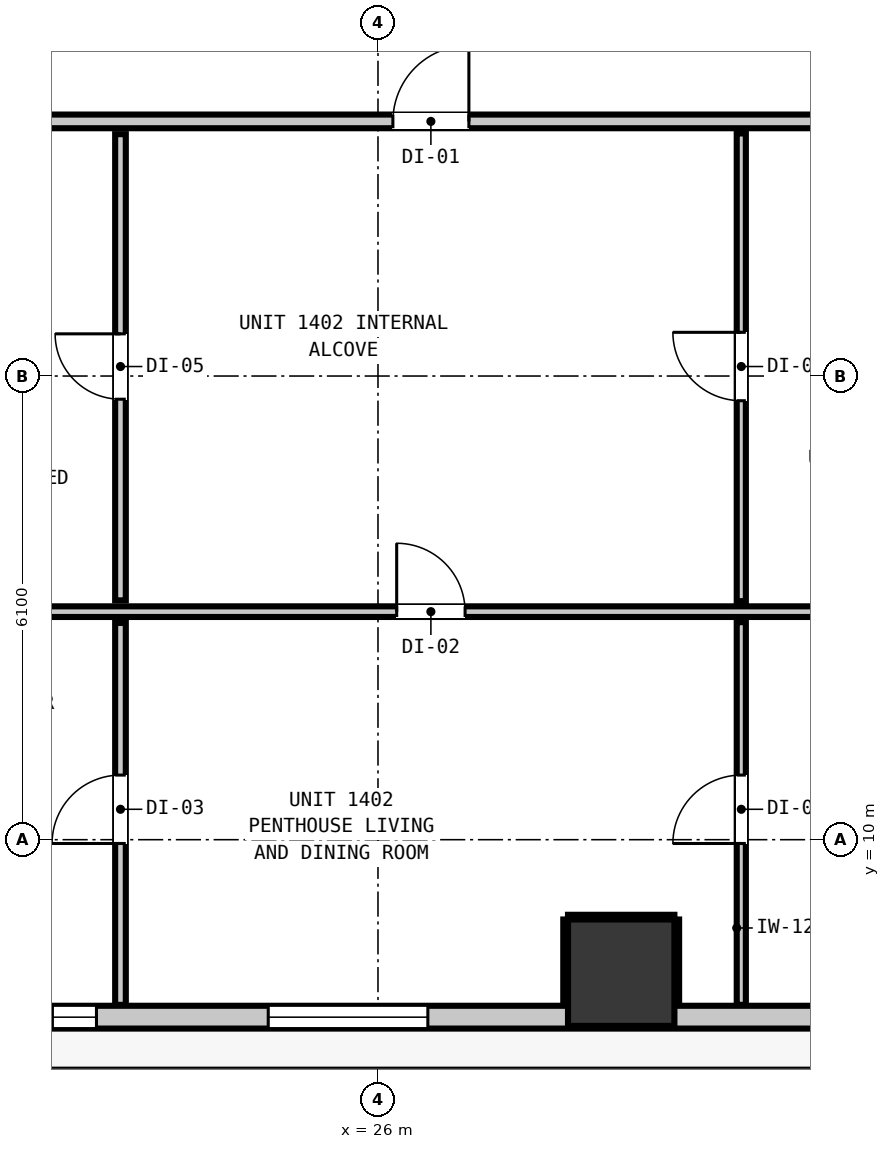
"""IFC4 building model, lengths in metres.
Left out: names, types, materials, properties, quantities, classifications, styles, units other than length and angle.
Written with IfcOpenShell. Run it as: python <this file> out.ifc"""

import sys

from ifc_helpers import new_model, si_unit, direction, frame, frame_2d, origin, origin_2d, place, context, subcontext, project, spatial, rectangle, extrude, element, fill, save


model = new_model("IFC4")
c1 = context("Model", 3, precision=1e-05, world=origin(), true_north=direction((0.0, 1.0)))
c2 = subcontext(c1, "Body", "Model", "MODEL_VIEW")
j1 = project(units=[si_unit("LENGTHUNIT", "METRE"), si_unit("PLANEANGLEUNIT", "RADIAN")], contexts=[c1])
p1 = place(None, origin())
s1 = spatial("IfcSite", under=j1, at=p1, CompositionType="ELEMENT")
p2 = place(p1, origin())
s2 = spatial("IfcBuilding", under=s1, at=p2, CompositionType="ELEMENT")
p3 = place(p2, frame((0.0, 0.0, 51.88)))
s3 = spatial("IfcBuildingStorey", under=s2, at=p3, CompositionType="ELEMENT", Elevation=51.88)
p4 = place(p3, frame((29.2, 8.25, 0.0), z_axis=(0.0, 0.0, 1.0), x_axis=(1.0, 0.0, 0.0)))
e1 = element("IfcColumn", 1, at=p4, inside=s3, PredefinedType="COLUMN", context=c2, shape_type="SweptSolid", body=[
    extrude(rectangle(XDim=1.4, YDim=1.4, at=origin_2d()), origin(), (0.0, 0.0, 1.0), 3.32),
])
p5 = place(p3, frame((47.835, 7.665, 0.0), z_axis=(0.0, 0.0, 1.0), x_axis=(-1.0, 0.0, 0.0)))
e2 = element("IfcWall", 2, at=p5, inside=s3, PredefinedType="STANDARD", context=c2, shape_type="SweptSolid", body=[
    extrude(rectangle(XDim=37.47, YDim=0.3, at=frame_2d((18.735, 0.0))), origin(), (0.0, 0.0, 1.0), 3.06),
])
p6 = place(p5, frame((2.301, 0.0, 0.0)))
e3 = element("IfcOpeningElement", 3, at=p6, cuts=e2, PredefinedType="OPENING", context=c2, shape_type="SweptSolid", body=[
    extrude(rectangle(XDim=1.0, YDim=2.15, at=frame_2d((0.5, 1.075))), frame((0.0, 0.16, 0.0), z_axis=(0.0, -1.0, 0.0), x_axis=(1.0, 0.0, 0.0)), (0.0, 0.0, 1.0), 0.32),
])
p7 = place(p5, frame((32.251, 0.0, 0.85)))
e4 = element("IfcOpeningElement", 4, at=p7, cuts=e2, PredefinedType="OPENING", context=c2, shape_type="SweptSolid", body=[
    extrude(rectangle(XDim=1.05, YDim=1.65, at=frame_2d((0.525, 0.825))), frame((0.0, 0.16, 0.0), z_axis=(0.0, -1.0, 0.0), x_axis=(1.0, 0.0, 0.0)), (0.0, 0.0, 1.0), 0.32),
])
p8 = place(p5, frame((21.179, 0.0, 0.85)))
e5 = element("IfcOpeningElement", 5, at=p8, cuts=e2, PredefinedType="OPENING", context=c2, shape_type="SweptSolid", body=[
    extrude(rectangle(XDim=2.1, YDim=1.9, at=frame_2d((1.05, 0.95))), frame((0.0, 0.16, 0.0), z_axis=(0.0, -1.0, 0.0), x_axis=(1.0, 0.0, 0.0)), (0.0, 0.0, 1.0), 0.32),
])
p9 = place(p5, frame((25.539, 0.0, 0.85)))
e6 = element("IfcOpeningElement", 6, at=p9, cuts=e2, PredefinedType="OPENING", context=c2, shape_type="SweptSolid", body=[
    extrude(rectangle(XDim=0.58, YDim=1.5, at=frame_2d((0.29, 0.75))), frame((0.0, 0.16, 0.0), z_axis=(0.0, -1.0, 0.0), x_axis=(1.0, 0.0, 0.0)), (0.0, 0.0, 1.0), 0.32),
])
p10 = place(p5, frame((13.985, 0.0, 0.85)))
e7 = element("IfcOpeningElement", 7, at=p10, cuts=e2, PredefinedType="OPENING", context=c2, shape_type="SweptSolid", body=[
    extrude(rectangle(XDim=2.1, YDim=1.9, at=frame_2d((1.05, 0.95))), frame((0.0, 0.16, 0.0), z_axis=(0.0, -1.0, 0.0), x_axis=(1.0, 0.0, 0.0)), (0.0, 0.0, 1.0), 0.32),
])
p11 = place(p5, frame((5.412, 0.0, 0.85)))
e8 = element("IfcOpeningElement", 8, at=p11, cuts=e2, PredefinedType="OPENING", context=c2, shape_type="SweptSolid", body=[
    extrude(rectangle(XDim=2.1, YDim=1.9, at=frame_2d((1.05, 0.95))), frame((0.0, 0.16, 0.0), z_axis=(0.0, -1.0, 0.0), x_axis=(1.0, 0.0, 0.0)), (0.0, 0.0, 1.0), 0.32),
])
p12 = place(p5, frame((9.839, 0.0, 0.85)))
e9 = element("IfcOpeningElement", 9, at=p12, cuts=e2, PredefinedType="OPENING", context=c2, shape_type="SweptSolid", body=[
    extrude(rectangle(XDim=0.58, YDim=1.5, at=frame_2d((0.29, 0.75))), frame((0.0, 0.16, 0.0), z_axis=(0.0, -1.0, 0.0), x_axis=(1.0, 0.0, 0.0)), (0.0, 0.0, 1.0), 0.32),
])
p13 = place(p5, frame((0.364, 0.0, 0.85)))
e10 = element("IfcOpeningElement", 10, at=p13, cuts=e2, PredefinedType="OPENING", context=c2, shape_type="SweptSolid", body=[
    extrude(rectangle(XDim=1.05, YDim=1.65, at=frame_2d((0.525, 0.825))), frame((0.0, 0.16, 0.0), z_axis=(0.0, -1.0, 0.0), x_axis=(1.0, 0.0, 0.0)), (0.0, 0.0, 1.0), 0.32),
])
p14 = place(p3, frame((8.027, 19.45, 0.0), z_axis=(0.0, 0.0, 1.0), x_axis=(1.0, 0.0, 0.0)))
e11 = element("IfcWall", 11, at=p14, inside=s3, PredefinedType="PARTITIONING", context=c2, shape_type="SweptSolid", body=[
    extrude(rectangle(XDim=42.146, YDim=0.18, at=frame_2d((21.073, 0.0))), origin(), (0.0, 0.0, 1.0), 3.06),
])
p15 = place(p14, frame((5.256, 0.0, 0.0)))
e12 = element("IfcOpeningElement", 12, at=p15, cuts=e11, PredefinedType="OPENING", context=c2, shape_type="SweptSolid", body=[
    extrude(rectangle(XDim=1.0, YDim=2.15, at=frame_2d((0.5, 1.075))), frame((0.0, 0.1, 0.0), z_axis=(0.0, -1.0, 0.0), x_axis=(1.0, 0.0, 0.0)), (0.0, 0.0, 1.0), 0.2),
])
p16 = place(p14, frame((18.169, 0.0, 0.0)))
e13 = element("IfcOpeningElement", 13, at=p16, cuts=e11, PredefinedType="OPENING", context=c2, shape_type="SweptSolid", body=[
    extrude(rectangle(XDim=1.0, YDim=2.15, at=frame_2d((0.5, 1.075))), frame((0.0, 0.1, 0.0), z_axis=(0.0, -1.0, 0.0), x_axis=(1.0, 0.0, 0.0)), (0.0, 0.0, 1.0), 0.2),
])
p17 = place(p14, frame((33.653, 0.0, 0.0)))
e14 = element("IfcOpeningElement", 14, at=p17, cuts=e11, PredefinedType="OPENING", context=c2, shape_type="SweptSolid", body=[
    extrude(rectangle(XDim=1.0, YDim=2.15, at=frame_2d((0.5, 1.075))), frame((0.0, 0.1, 0.0), z_axis=(0.0, -1.0, 0.0), x_axis=(1.0, 0.0, 0.0)), (0.0, 0.0, 1.0), 0.2),
])
p18 = place(p3, frame((19.12, 13.0, 0.0), z_axis=(0.0, 0.0, 1.0), x_axis=(1.0, 0.0, 0.0)))
e15 = element("IfcWall", 15, at=p18, inside=s3, PredefinedType="PARTITIONING", context=c2, shape_type="SweptSolid", body=[
    extrude(rectangle(XDim=31.053, YDim=0.14, at=frame_2d((15.526, 0.0))), origin(), (0.0, 0.0, 1.0), 3.06),
])
p19 = place(p18, frame((7.126, 0.0, 0.0)))
e16 = element("IfcOpeningElement", 16, at=p19, cuts=e15, PredefinedType="OPENING", context=c2, shape_type="SweptSolid", body=[
    extrude(rectangle(XDim=0.9, YDim=2.1, at=frame_2d((0.45, 1.05))), frame((0.0, 0.08, 0.0), z_axis=(0.0, -1.0, 0.0), x_axis=(1.0, 0.0, 0.0)), (0.0, 0.0, 1.0), 0.16),
])
p20 = place(p18, frame((22.609, 0.0, 0.0)))
e17 = element("IfcOpeningElement", 17, at=p20, cuts=e15, PredefinedType="OPENING", context=c2, shape_type="SweptSolid", body=[
    extrude(rectangle(XDim=0.9, YDim=2.1, at=frame_2d((0.45, 1.05))), frame((0.0, 0.08, 0.0), z_axis=(0.0, -1.0, 0.0), x_axis=(1.0, 0.0, 0.0)), (0.0, 0.0, 1.0), 0.16),
])
p21 = place(p3, frame((22.612, 7.827, 0.0), z_axis=(0.0, 0.0, 1.0), x_axis=(0.0, 1.0, 0.0)))
e18 = element("IfcWall", 18, at=p21, inside=s3, PredefinedType="PARTITIONING", context=c2, shape_type="SweptSolid", body=[
    extrude(rectangle(XDim=5.025, YDim=0.14, at=frame_2d((2.513, 0.0))), origin(), (0.0, 0.0, 1.0), 3.06),
])
p22 = place(p21, frame((2.123, 0.0, 0.0)))
e19 = element("IfcOpeningElement", 19, at=p22, cuts=e18, PredefinedType="OPENING", context=c2, shape_type="SweptSolid", body=[
    extrude(rectangle(XDim=0.9, YDim=2.1, at=frame_2d((0.45, 1.05))), frame((0.0, 0.08, 0.0), z_axis=(0.0, -1.0, 0.0), x_axis=(1.0, 0.0, 0.0)), (0.0, 0.0, 1.0), 0.16),
])
p23 = place(p3, frame((22.612, 13.148, 0.0), z_axis=(0.0, 0.0, 1.0), x_axis=(0.0, 1.0, 0.0)))
e20 = element("IfcWall", 20, at=p23, inside=s3, PredefinedType="PARTITIONING", context=c2, shape_type="SweptSolid", body=[
    extrude(rectangle(XDim=6.134, YDim=0.14, at=frame_2d((3.067, 0.0))), origin(), (0.0, 0.0, 1.0), 3.06),
])
p24 = place(p23, frame((2.647, 0.0, 0.0)))
e21 = element("IfcOpeningElement", 21, at=p24, cuts=e20, PredefinedType="OPENING", context=c2, shape_type="SweptSolid", body=[
    extrude(rectangle(XDim=0.86, YDim=2.02, at=frame_2d((0.43, 1.01))), frame((0.0, 0.08, 0.0), z_axis=(0.0, -1.0, 0.0), x_axis=(1.0, 0.0, 0.0)), (0.0, 0.0, 1.0), 0.16),
])
p25 = place(p3, frame((30.78, 7.827, 0.0), z_axis=(0.0, 0.0, 1.0), x_axis=(0.0, 1.0, 0.0)))
e22 = element("IfcWall", 22, at=p25, inside=s3, PredefinedType="PARTITIONING", context=c2, shape_type="SweptSolid", body=[
    extrude(rectangle(XDim=5.035, YDim=0.12, at=frame_2d((2.518, 0.0))), origin(), (0.0, 0.0, 1.0), 3.06),
])
p26 = place(p25, frame((2.123, 0.0, 0.0)))
e23 = element("IfcOpeningElement", 23, at=p26, cuts=e22, PredefinedType="OPENING", context=c2, shape_type="SweptSolid", body=[
    extrude(rectangle(XDim=0.9, YDim=2.1, at=frame_2d((0.45, 1.05))), frame((0.0, 0.07, 0.0), z_axis=(0.0, -1.0, 0.0), x_axis=(1.0, 0.0, 0.0)), (0.0, 0.0, 1.0), 0.14),
])
p27 = place(p3, frame((30.78, 13.138, 0.0), z_axis=(0.0, 0.0, 1.0), x_axis=(0.0, 1.0, 0.0)))
e24 = element("IfcWall", 24, at=p27, inside=s3, PredefinedType="PARTITIONING", context=c2, shape_type="SweptSolid", body=[
    extrude(rectangle(XDim=6.154, YDim=0.12, at=frame_2d((3.077, 0.0))), origin(), (0.0, 0.0, 1.0), 3.06),
])
p28 = place(p27, frame((2.637, 0.0, 0.0)))
e25 = element("IfcOpeningElement", 25, at=p28, cuts=e24, PredefinedType="OPENING", context=c2, shape_type="SweptSolid", body=[
    extrude(rectangle(XDim=0.9, YDim=2.1, at=frame_2d((0.45, 1.05))), frame((0.0, 0.07, 0.0), z_axis=(0.0, -1.0, 0.0), x_axis=(1.0, 0.0, 0.0)), (0.0, 0.0, 1.0), 0.14),
])
p29 = place(p3, frame((28.5, 8.982, 0.0), z_axis=(0.0, 0.0, 1.0), x_axis=(1.0, 0.0, 0.0)))
e26 = element("IfcWall", 26, at=p29, inside=s3, PredefinedType="PARTITIONING", context=c2, shape_type="SweptSolid", body=[
    extrude(rectangle(XDim=1.4, YDim=0.06, at=frame_2d((0.7, 0.0))), origin(), (0.0, 0.0, 1.0), 1.45),
])
for number, where, z_axis, x_axis in (
    (27, (28.468, 7.83, 0.0), (0.0, 0.0, 1.0), (0.0, 1.0, 0.0)),
    (28, (29.932, 7.83, 0.0), (0.0, 0.0, 1.0), (0.0, 1.0, 0.0)),
):
    element("IfcWall", number, at=place(p3, frame(where, z_axis=z_axis, x_axis=x_axis)), inside=s3, PredefinedType="PARTITIONING", context=c2, shape_type="SweptSolid", body=[
        extrude(rectangle(XDim=1.12, YDim=0.06, at=frame_2d((0.56, 0.0))), origin(), (0.0, 0.0, 1.0), 1.45),
    ])
p30 = place(p8, origin())
e29 = element("IfcWindow", 29, at=p30, inside=s3, PartitioningType="SINGLE_PANEL", PredefinedType="WINDOW", context=c2, shape_type="SweptSolid", body=[
    extrude(rectangle(XDim=2.1, YDim=1.9, at=frame_2d((1.05, 0.95))), frame((0.0, 0.03, 0.0), z_axis=(0.0, -1.0, 0.0), x_axis=(1.0, 0.0, 0.0)), (0.0, 0.0, 1.0), 0.06),
])
fill(e5, e29)
p31 = place(p9, origin())
e30 = element("IfcWindow", 30, at=p31, inside=s3, PartitioningType="SINGLE_PANEL", PredefinedType="WINDOW", context=c2, shape_type="SweptSolid", body=[
    extrude(rectangle(XDim=0.58, YDim=1.5, at=frame_2d((0.29, 0.75))), frame((0.0, 0.03, 0.0), z_axis=(0.0, -1.0, 0.0), x_axis=(1.0, 0.0, 0.0)), (0.0, 0.0, 1.0), 0.06),
])
fill(e6, e30)
p32 = place(p16, origin())
e31 = element("IfcDoor", 31, at=p32, inside=s3, OperationType="SINGLE_SWING_RIGHT", PredefinedType="DOOR", context=c2, shape_type="SweptSolid", body=[
    extrude(rectangle(XDim=1.0, YDim=2.15, at=frame_2d((0.5, 1.075))), frame((0.0, 0.025, 0.0), z_axis=(0.0, -1.0, 0.0), x_axis=(1.0, 0.0, 0.0)), (0.0, 0.0, 1.0), 0.05),
])
fill(e13, e31)
p33 = place(p19, origin())
e32 = element("IfcDoor", 32, at=p33, inside=s3, OperationType="SINGLE_SWING_LEFT", PredefinedType="DOOR", context=c2, shape_type="SweptSolid", body=[
    extrude(rectangle(XDim=0.9, YDim=2.1, at=frame_2d((0.45, 1.05))), frame((0.0, 0.025, 0.0), z_axis=(0.0, -1.0, 0.0), x_axis=(1.0, 0.0, 0.0)), (0.0, 0.0, 1.0), 0.05),
])
fill(e16, e32)
p34 = place(p24, origin())
e33 = element("IfcDoor", 33, at=p34, inside=s3, OperationType="SINGLE_SWING_RIGHT", PredefinedType="DOOR", context=c2, shape_type="SweptSolid", body=[
    extrude(rectangle(XDim=0.86, YDim=2.02, at=frame_2d((0.43, 1.01))), frame((0.0, 0.025, 0.0), z_axis=(0.0, -1.0, 0.0), x_axis=(1.0, 0.0, 0.0)), (0.0, 0.0, 1.0), 0.05),
])
fill(e21, e33)
p35 = place(p22, origin())
e34 = element("IfcDoor", 34, at=p35, inside=s3, OperationType="SINGLE_SWING_LEFT", PredefinedType="DOOR", context=c2, shape_type="SweptSolid", body=[
    extrude(rectangle(XDim=0.9, YDim=2.1, at=frame_2d((0.45, 1.05))), frame((0.0, 0.025, 0.0), z_axis=(0.0, -1.0, 0.0), x_axis=(1.0, 0.0, 0.0)), (0.0, 0.0, 1.0), 0.05),
])
fill(e19, e34)
p36 = place(p28, origin())
e35 = element("IfcDoor", 35, at=p36, inside=s3, OperationType="SINGLE_SWING_RIGHT", PredefinedType="DOOR", context=c2, shape_type="SweptSolid", body=[
    extrude(rectangle(XDim=0.9, YDim=2.1, at=frame_2d((0.45, 1.05))), frame((0.0, 0.025, 0.0), z_axis=(0.0, -1.0, 0.0), x_axis=(1.0, 0.0, 0.0)), (0.0, 0.0, 1.0), 0.05),
])
fill(e25, e35)
p37 = place(p26, origin())
e36 = element("IfcDoor", 36, at=p37, inside=s3, OperationType="SINGLE_SWING_LEFT", PredefinedType="DOOR", context=c2, shape_type="SweptSolid", body=[
    extrude(rectangle(XDim=0.9, YDim=2.1, at=frame_2d((0.45, 1.05))), frame((0.0, 0.025, 0.0), z_axis=(0.0, -1.0, 0.0), x_axis=(1.0, 0.0, 0.0)), (0.0, 0.0, 1.0), 0.05),
])
fill(e23, e36)
save(model, sys.argv[1])
